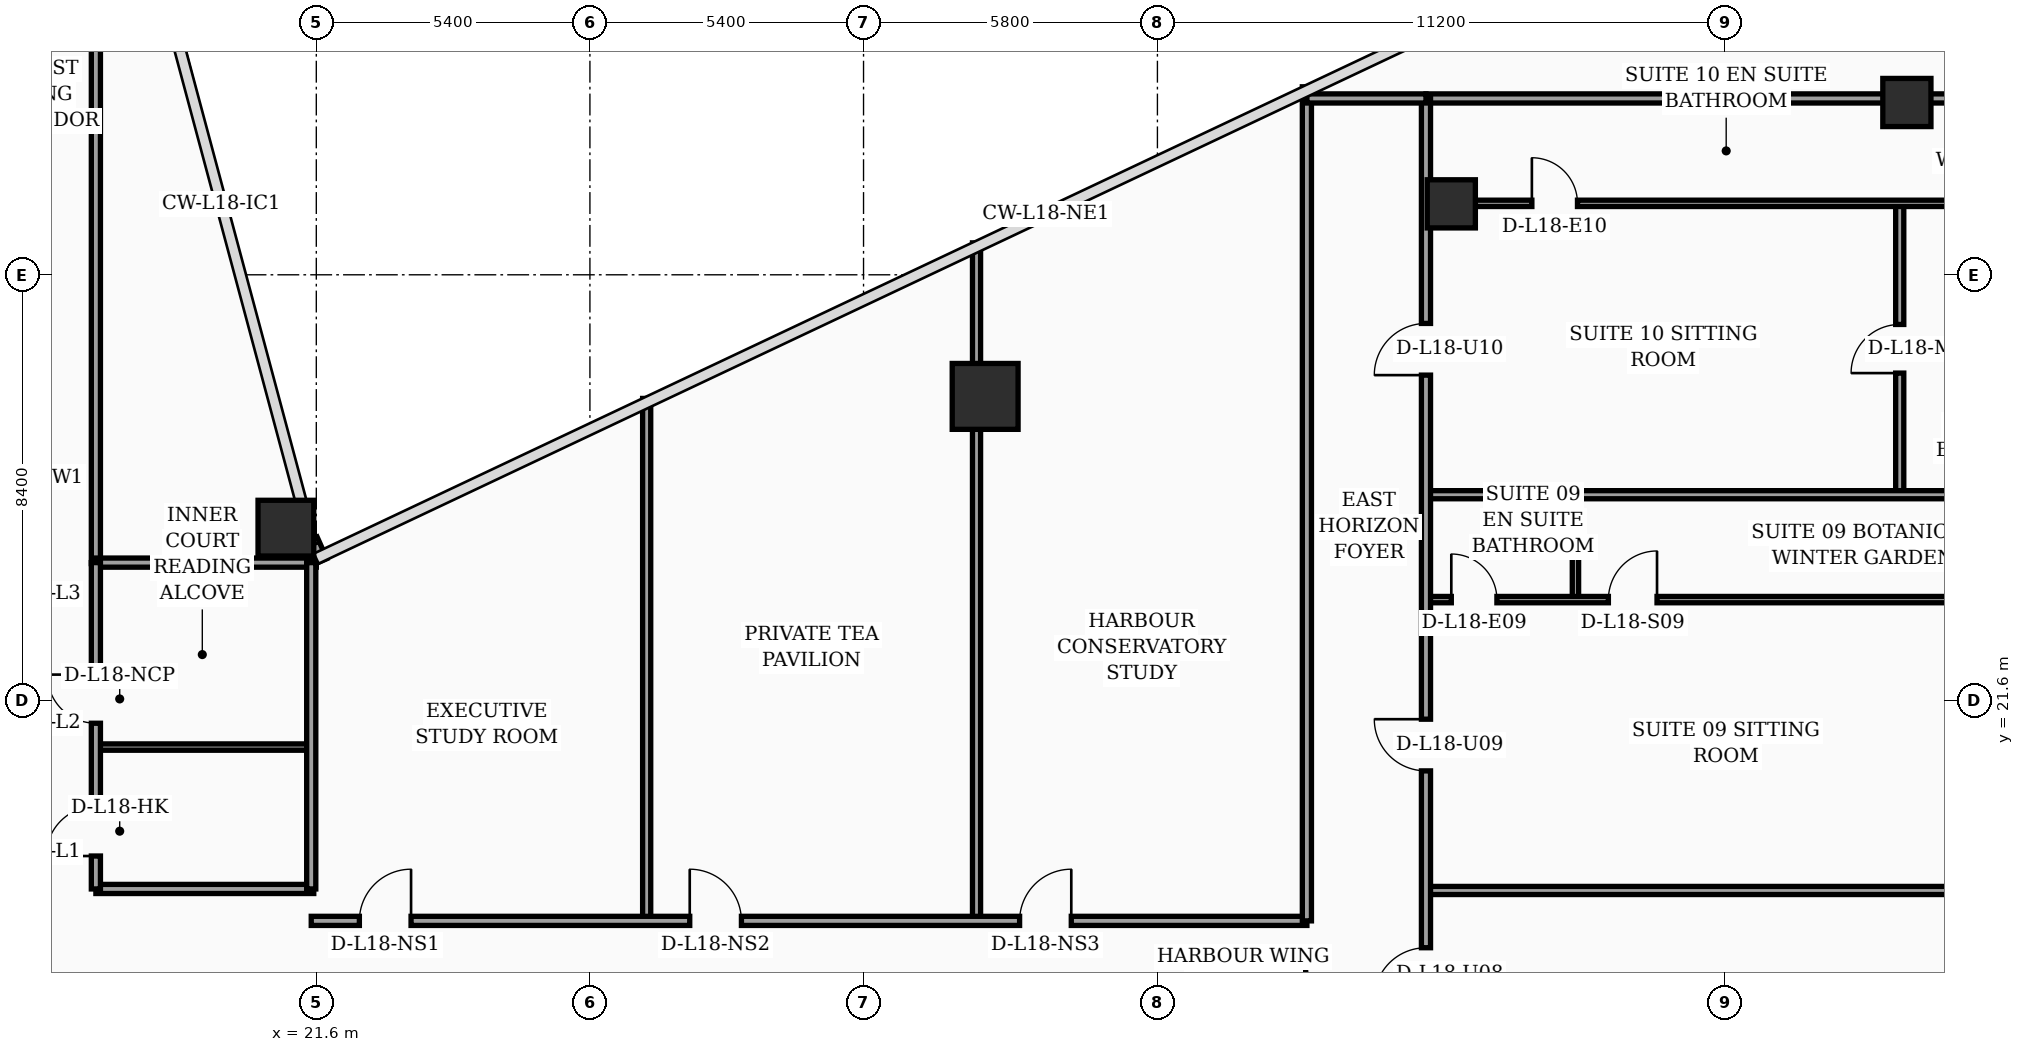
"""IFC4 building model, lengths in metres.
Left out: names, types, materials, properties, quantities, classifications, styles, units other than length and angle.
Written with IfcOpenShell. Run it as: python <this file> out.ifc"""

import sys

from ifc_helpers import new_model, si_unit, direction, frame, frame_2d, origin, origin_2d, place, context, subcontext, project, spatial, rectangle, hollow_rectangle, circle, extrude, element, fill, save


model = new_model("IFC4")
c1 = context("Model", 3, precision=1e-05, world=origin(), true_north=direction((0.0, 1.0)))
c2 = subcontext(c1, "Body", "Model", "MODEL_VIEW")
j1 = project(units=[si_unit("LENGTHUNIT", "METRE"), si_unit("PLANEANGLEUNIT", "RADIAN")], contexts=[c1])
p1 = place(None, origin())
s1 = spatial("IfcSite", under=j1, at=p1, CompositionType="ELEMENT")
p2 = place(p1, origin())
s2 = spatial("IfcBuilding", under=s1, at=p2, CompositionType="ELEMENT")
p3 = place(p2, frame((0.0, 0.0, 77.4)))
s3 = spatial("IfcBuildingStorey", under=s2, at=p3, CompositionType="ELEMENT", Elevation=77.4)
p4 = place(p3, frame((21.0, 25.0, 0.0), z_axis=(0.0, 0.0, 1.0), x_axis=(1.0, 0.0, 0.0)))
e1 = element("IfcColumn", 1, at=p4, inside=s3, PredefinedType="COLUMN", context=c2, shape_type="SweptSolid", body=[
    extrude(hollow_rectangle(XDim=1.1, YDim=1.1, WallThickness=0.045, at=origin_2d()), origin(), (0.0, 0.0, 1.0), 3.56),
])
p5 = place(p3, frame((34.8, 27.6, 0.0), z_axis=(0.0, 0.0, 1.0), x_axis=(1.0, 0.0, 0.0)))
e2 = element("IfcColumn", 2, at=p5, inside=s3, PredefinedType="COLUMN", context=c2, shape_type="SweptSolid", body=[
    extrude(circle(Radius=0.65, at=origin_2d()), origin(), (0.0, 0.0, 1.0), 3.56),
])
for number, where, z_axis, x_axis in (
    (3, (44.0, 31.4, 0.0), (0.0, 0.0, 1.0), (1.0, 0.0, 0.0)),
    (4, (52.991, 33.4, 0.0), (0.0, 0.0, 1.0), (1.0, 0.0, 0.0)),
):
    element("IfcColumn", number, at=place(p3, frame(where, z_axis=z_axis, x_axis=x_axis)), inside=s3, PredefinedType="COLUMN", context=c2, shape_type="SweptSolid", body=[
        extrude(hollow_rectangle(XDim=0.95, YDim=0.95, WallThickness=0.04, at=origin_2d()), origin(), (0.0, 0.0, 1.0), 3.56),
    ])
p6 = place(p3, frame((21.68, 24.34, 0.0), z_axis=(0.0, 0.0, 1.0), x_axis=(-0.40758134973, 0.913168901875, 0.0)))
e5 = element("IfcWall", 5, at=p6, inside=s3, PredefinedType="SOLIDWALL", context=c2, shape_type="SweptSolid", body=[
    extrude(rectangle(XDim=0.471, YDim=0.28, at=frame_2d((0.235, 0.0))), origin(), (0.0, 0.0, 1.0), 3.56),
])
p7 = place(p3, frame((17.25, 24.3, 0.0), z_axis=(0.0, 0.0, 1.0), x_axis=(0.0, 1.0, 0.0)))
e6 = element("IfcWall", 6, at=p7, inside=s3, PredefinedType="PARTITIONING", context=c2, shape_type="SweptSolid", body=[
    extrude(rectangle(XDim=16.4, YDim=0.18, at=frame_2d((8.2, 0.0))), origin(), (0.0, 0.0, 1.0), 2.84),
])
p8 = place(p3, frame((17.25, 17.88, 0.0), z_axis=(0.0, 0.0, 1.0), x_axis=(1.0, 0.0, 0.0)))
e7 = element("IfcWall", 7, at=p8, inside=s3, PredefinedType="PARTITIONING", context=c2, shape_type="SweptSolid", body=[
    extrude(rectangle(XDim=4.3, YDim=0.18, at=frame_2d((2.15, 0.0))), origin(), (0.0, 0.0, 1.0), 3.09),
])
p9 = place(p3, frame((17.25, 20.68, 0.0), z_axis=(0.0, 0.0, 1.0), x_axis=(1.0, 0.0, 0.0)))
e8 = element("IfcWall", 8, at=p9, inside=s3, PredefinedType="PARTITIONING", context=c2, shape_type="SweptSolid", body=[
    extrude(rectangle(XDim=4.3, YDim=0.125, at=frame_2d((2.15, 0.0))), origin(), (0.0, 0.0, 1.0), 3.56),
])
p10 = place(p3, frame((17.25, 24.32, 0.0), z_axis=(0.0, 0.0, 1.0), x_axis=(1.0, 0.0, 0.0)))
e9 = element("IfcWall", 9, at=p10, inside=s3, PredefinedType="PARTITIONING", context=c2, shape_type="SweptSolid", body=[
    extrude(rectangle(XDim=4.35, YDim=0.18, at=frame_2d((2.175, 0.0))), origin(), (0.0, 0.0, 1.0), 3.56),
])
p11 = place(p3, frame((21.5, 17.88, 0.0), z_axis=(0.0, 0.0, 1.0), x_axis=(0.0, 1.0, 0.0)))
e10 = element("IfcWall", 10, at=p11, inside=s3, PredefinedType="PARTITIONING", context=c2, shape_type="SweptSolid", body=[
    extrude(rectangle(XDim=6.44, YDim=0.18, at=frame_2d((3.22, 0.0))), origin(), (0.0, 0.0, 1.0), 3.09),
])
p12 = place(p3, frame((17.25, 17.88, 0.0), z_axis=(0.0, 0.0, 1.0), x_axis=(0.0, 1.0, 0.0)))
e11 = element("IfcWall", 11, at=p12, inside=s3, PredefinedType="PARTITIONING", context=c2, shape_type="SweptSolid", body=[
    extrude(rectangle(XDim=6.44, YDim=0.18, at=frame_2d((3.22, 0.0))), origin(), (0.0, 0.0, 1.0), 3.09),
])
p13 = place(p12, frame((0.65, 0.0, 0.0)))
e12 = element("IfcOpeningElement", 12, at=p13, cuts=e11, PredefinedType="OPENING", context=c2, shape_type="SweptSolid", body=[
    extrude(rectangle(XDim=0.98, YDim=2.15, at=frame_2d((0.49, 1.075))), frame((0.0, 0.1, 0.0), z_axis=(0.0, -1.0, 0.0), x_axis=(1.0, 0.0, 0.0)), (0.0, 0.0, 1.0), 0.2),
])
p14 = place(p12, frame((3.27, 0.0, 0.0)))
e13 = element("IfcOpeningElement", 13, at=p14, cuts=e11, PredefinedType="OPENING", context=c2, shape_type="SweptSolid", body=[
    extrude(rectangle(XDim=0.96, YDim=2.2, at=frame_2d((0.48, 1.1))), frame((0.0, 0.1, 0.0), z_axis=(0.0, -1.0, 0.0), x_axis=(1.0, 0.0, 0.0)), (0.0, 0.0, 1.0), 0.2),
])
p15 = place(p3, frame((28.12, 17.25, 0.0), z_axis=(0.0, 0.0, 1.0), x_axis=(0.0, 1.0, 0.0)))
e14 = element("IfcWall", 14, at=p15, inside=s3, PredefinedType="PARTITIONING", context=c2, shape_type="SweptSolid", body=[
    extrude(rectangle(XDim=10.31, YDim=0.16, at=frame_2d((5.155, 0.0))), origin(), (0.0, 0.0, 1.0), 2.84),
])
p16 = place(p3, frame((34.63, 17.25, 0.0), z_axis=(0.0, 0.0, 1.0), x_axis=(0.0, 1.0, 0.0)))
e15 = element("IfcWall", 15, at=p16, inside=s3, PredefinedType="PARTITIONING", context=c2, shape_type="SweptSolid", body=[
    extrude(rectangle(XDim=13.38, YDim=0.16, at=frame_2d((6.69, 0.0))), origin(), (0.0, 0.0, 1.0), 2.84),
])
p17 = place(p3, frame((21.5, 17.25, 0.0), z_axis=(0.0, 0.0, 1.0), x_axis=(1.0, 0.0, 0.0)))
e16 = element("IfcWall", 16, at=p17, inside=s3, PredefinedType="PARTITIONING", context=c2, shape_type="SweptSolid", body=[
    extrude(rectangle(XDim=19.65, YDim=0.18, at=frame_2d((9.825, 0.0))), origin(), (0.0, 0.0, 1.0), 2.84),
])
p18 = place(p17, frame((0.95, 0.0, 0.0)))
e17 = element("IfcOpeningElement", 17, at=p18, cuts=e16, PredefinedType="OPENING", context=c2, shape_type="SweptSolid", body=[
    extrude(rectangle(XDim=1.02, YDim=2.2, at=frame_2d((0.51, 1.1))), frame((0.0, 0.1, 0.0), z_axis=(0.0, -1.0, 0.0), x_axis=(1.0, 0.0, 0.0)), (0.0, 0.0, 1.0), 0.2),
])
p19 = place(p17, frame((7.47, 0.0, 0.0)))
e18 = element("IfcOpeningElement", 18, at=p19, cuts=e16, PredefinedType="OPENING", context=c2, shape_type="SweptSolid", body=[
    extrude(rectangle(XDim=1.02, YDim=2.2, at=frame_2d((0.51, 1.1))), frame((0.0, 0.1, 0.0), z_axis=(0.0, -1.0, 0.0), x_axis=(1.0, 0.0, 0.0)), (0.0, 0.0, 1.0), 0.2),
])
p20 = place(p17, frame((13.98, 0.0, 0.0)))
e19 = element("IfcOpeningElement", 19, at=p20, cuts=e16, PredefinedType="OPENING", context=c2, shape_type="SweptSolid", body=[
    extrude(rectangle(XDim=1.02, YDim=2.2, at=frame_2d((0.51, 1.1))), frame((0.0, 0.1, 0.0), z_axis=(0.0, -1.0, 0.0), x_axis=(1.0, 0.0, 0.0)), (0.0, 0.0, 1.0), 0.2),
])
p21 = place(p3, frame((41.15, 17.25, 0.0), z_axis=(0.0, 0.0, 1.0), x_axis=(0.0, 1.0, 0.0)))
e20 = element("IfcWall", 20, at=p21, inside=s3, PredefinedType="PARTITIONING", context=c2, shape_type="SweptSolid", body=[
    extrude(rectangle(XDim=16.46, YDim=0.18, at=frame_2d((8.23, 0.0))), origin(), (0.0, 0.0, 1.0), 2.84),
])
p22 = place(p3, frame((46.45, 23.59, 0.0), z_axis=(0.0, 0.0, 1.0), x_axis=(0.0, 1.0, 0.0)))
e21 = element("IfcWall", 21, at=p22, inside=s3, PredefinedType="PARTITIONING", context=c2, shape_type="SweptSolid", body=[
    extrude(rectangle(XDim=2.07, YDim=0.125, at=frame_2d((1.035, 0.0))), origin(), (0.0, 0.0, 1.0), 3.19),
])
p23 = place(p3, frame((43.5, 23.59, 0.0), z_axis=(0.0, 0.0, 1.0), x_axis=(1.0, 0.0, 0.0)))
e22 = element("IfcWall", 22, at=p23, inside=s3, PredefinedType="PARTITIONING", context=c2, shape_type="SweptSolid", body=[
    extrude(rectangle(XDim=14.37, YDim=0.125, at=frame_2d((7.185, 0.0))), origin(), (0.0, 0.0, 1.0), 2.84),
])
p24 = place(p23, frame((0.5, 0.0, 0.0)))
e23 = element("IfcOpeningElement", 23, at=p24, cuts=e22, PredefinedType="OPENING", context=c2, shape_type="SweptSolid", body=[
    extrude(rectangle(XDim=0.9, YDim=2.15, at=frame_2d((0.45, 1.075))), frame((0.0, 0.073, 0.0), z_axis=(0.0, -1.0, 0.0), x_axis=(1.0, 0.0, 0.0)), (0.0, 0.0, 1.0), 0.145),
])
p25 = place(p23, frame((3.6, 0.0, 0.0)))
e24 = element("IfcOpeningElement", 24, at=p25, cuts=e22, PredefinedType="OPENING", context=c2, shape_type="SweptSolid", body=[
    extrude(rectangle(XDim=0.96, YDim=2.2, at=frame_2d((0.48, 1.1))), frame((0.0, 0.073, 0.0), z_axis=(0.0, -1.0, 0.0), x_axis=(1.0, 0.0, 0.0)), (0.0, 0.0, 1.0), 0.145),
])
p26 = place(p3, frame((52.85, 25.66, 0.0), z_axis=(0.0, 0.0, 1.0), x_axis=(0.0, 1.0, 0.0)))
e25 = element("IfcWall", 25, at=p26, inside=s3, PredefinedType="PARTITIONING", context=c2, shape_type="SweptSolid", body=[
    extrude(rectangle(XDim=5.75, YDim=0.16, at=frame_2d((2.875, 0.0))), origin(), (0.0, 0.0, 1.0), 3.56),
])
p27 = place(p26, frame((2.4, 0.0, 0.0)))
e26 = element("IfcOpeningElement", 26, at=p27, cuts=e25, PredefinedType="OPENING", context=c2, shape_type="SweptSolid", body=[
    extrude(rectangle(XDim=0.96, YDim=2.2, at=frame_2d((0.48, 1.1))), frame((0.0, 0.09, 0.0), z_axis=(0.0, -1.0, 0.0), x_axis=(1.0, 0.0, 0.0)), (0.0, 0.0, 1.0), 0.18),
])
p28 = place(p3, frame((43.5, 31.41, 0.0), z_axis=(0.0, 0.0, 1.0), x_axis=(1.0, 0.0, 0.0)))
e27 = element("IfcWall", 27, at=p28, inside=s3, PredefinedType="PARTITIONING", context=c2, shape_type="SweptSolid", body=[
    extrude(rectangle(XDim=11.91, YDim=0.125, at=frame_2d((5.955, 0.0))), origin(), (0.0, 0.0, 1.0), 2.84),
])
p29 = place(p28, frame((2.09, 0.0, 0.0)))
e28 = element("IfcOpeningElement", 28, at=p29, cuts=e27, PredefinedType="OPENING", context=c2, shape_type="SweptSolid", body=[
    extrude(rectangle(XDim=0.9, YDim=2.15, at=frame_2d((0.45, 1.075))), frame((0.0, 0.073, 0.0), z_axis=(0.0, -1.0, 0.0), x_axis=(1.0, 0.0, 0.0)), (0.0, 0.0, 1.0), 0.145),
])
p30 = place(p3, frame((43.5, 25.66, 0.0), z_axis=(0.0, 0.0, 1.0), x_axis=(1.0, 0.0, 0.0)))
e29 = element("IfcWall", 29, at=p30, inside=s3, PredefinedType="PARTITIONING", context=c2, shape_type="SweptSolid", body=[
    extrude(rectangle(XDim=13.72, YDim=0.16, at=frame_2d((6.86, 0.0))), origin(), (0.0, 0.0, 1.0), 2.84),
])
p31 = place(p3, frame((43.5, 17.85, 0.0), z_axis=(0.0, 0.0, 1.0), x_axis=(1.0, 0.0, 0.0)))
e30 = element("IfcWall", 30, at=p31, inside=s3, PredefinedType="PARTITIONING", context=c2, shape_type="SweptSolid", body=[
    extrude(rectangle(XDim=16.18, YDim=0.16, at=frame_2d((8.09, 0.0))), origin(), (0.0, 0.0, 1.0), 2.84),
])
p32 = place(p3, frame((43.5, 33.48, 0.0), z_axis=(0.0, 0.0, 1.0), x_axis=(1.0, 0.0, 0.0)))
e31 = element("IfcWall", 31, at=p32, inside=s3, PredefinedType="PARTITIONING", context=c2, shape_type="SweptSolid", body=[
    extrude(rectangle(XDim=11.26, YDim=0.18, at=frame_2d((5.63, 0.0))), origin(), (0.0, 0.0, 1.0), 2.84),
])
p33 = place(p3, frame((43.5, 2.44, 0.0), z_axis=(0.0, 0.0, 1.0), x_axis=(0.0, 1.0, 0.0)))
e32 = element("IfcWall", 32, at=p33, inside=s3, PredefinedType="PARTITIONING", context=c2, shape_type="SweptSolid", body=[
    extrude(rectangle(XDim=31.04, YDim=0.18, at=frame_2d((15.52, 0.0))), origin(), (0.0, 0.0, 1.0), 2.84),
])
p34 = place(p33, frame((13.26, 0.0, 0.0)))
e33 = element("IfcOpeningElement", 33, at=p34, cuts=e32, PredefinedType="OPENING", context=c2, shape_type="SweptSolid", body=[
    extrude(rectangle(XDim=1.02, YDim=2.2, at=frame_2d((0.51, 1.1))), frame((0.0, 0.1, 0.0), z_axis=(0.0, -1.0, 0.0), x_axis=(1.0, 0.0, 0.0)), (0.0, 0.0, 1.0), 0.2),
])
p35 = place(p33, frame((17.77, 0.0, 0.0)))
e34 = element("IfcOpeningElement", 34, at=p35, cuts=e32, PredefinedType="OPENING", context=c2, shape_type="SweptSolid", body=[
    extrude(rectangle(XDim=1.02, YDim=2.2, at=frame_2d((0.51, 1.1))), frame((0.0, 0.1, 0.0), z_axis=(0.0, -1.0, 0.0), x_axis=(1.0, 0.0, 0.0)), (0.0, 0.0, 1.0), 0.2),
])
p36 = place(p33, frame((25.58, 0.0, 0.0)))
e35 = element("IfcOpeningElement", 35, at=p36, cuts=e32, PredefinedType="OPENING", context=c2, shape_type="SweptSolid", body=[
    extrude(rectangle(XDim=1.02, YDim=2.2, at=frame_2d((0.51, 1.1))), frame((0.0, 0.1, 0.0), z_axis=(0.0, -1.0, 0.0), x_axis=(1.0, 0.0, 0.0)), (0.0, 0.0, 1.0), 0.2),
])
p37 = place(p3, frame((41.15, 33.48, 0.0), z_axis=(0.0, 0.0, 1.0), x_axis=(1.0, 0.0, 0.0)))
e36 = element("IfcWall", 36, at=p37, inside=s3, PredefinedType="PARTITIONING", context=c2, shape_type="SweptSolid", body=[
    extrude(rectangle(XDim=2.35, YDim=0.18, at=frame_2d((1.175, 0.0))), origin(), (0.0, 0.0, 1.0), 3.56),
])
p38 = place(p13, origin())
e37 = element("IfcDoor", 37, at=p38, inside=s3, OperationType="SINGLE_SWING_LEFT", PredefinedType="DOOR", context=c2, shape_type="SweptSolid", body=[
    extrude(rectangle(XDim=0.98, YDim=2.15, at=frame_2d((0.49, 1.075))), frame((0.0, 0.025, 0.0), z_axis=(0.0, -1.0, 0.0), x_axis=(1.0, 0.0, 0.0)), (0.0, 0.0, 1.0), 0.05),
])
fill(e12, e37)
p39 = place(p14, origin())
e38 = element("IfcDoor", 38, at=p39, inside=s3, OperationType="SINGLE_SWING_RIGHT", PredefinedType="DOOR", context=c2, shape_type="SweptSolid", body=[
    extrude(rectangle(XDim=0.96, YDim=2.2, at=frame_2d((0.48, 1.1))), frame((0.0, 0.025, 0.0), z_axis=(0.0, -1.0, 0.0), x_axis=(1.0, 0.0, 0.0)), (0.0, 0.0, 1.0), 0.05),
])
fill(e13, e38)
p40 = place(p18, origin())
e39 = element("IfcDoor", 39, at=p40, inside=s3, OperationType="SINGLE_SWING_RIGHT", PredefinedType="DOOR", context=c2, shape_type="SweptSolid", body=[
    extrude(rectangle(XDim=1.02, YDim=2.2, at=frame_2d((0.51, 1.1))), frame((0.0, 0.025, 0.0), z_axis=(0.0, -1.0, 0.0), x_axis=(1.0, 0.0, 0.0)), (0.0, 0.0, 1.0), 0.05),
])
fill(e17, e39)
p41 = place(p19, origin())
e40 = element("IfcDoor", 40, at=p41, inside=s3, OperationType="SINGLE_SWING_LEFT", PredefinedType="DOOR", context=c2, shape_type="SweptSolid", body=[
    extrude(rectangle(XDim=1.02, YDim=2.2, at=frame_2d((0.51, 1.1))), frame((0.0, 0.025, 0.0), z_axis=(0.0, -1.0, 0.0), x_axis=(1.0, 0.0, 0.0)), (0.0, 0.0, 1.0), 0.05),
])
fill(e18, e40)
p42 = place(p20, origin())
e41 = element("IfcDoor", 41, at=p42, inside=s3, OperationType="SINGLE_SWING_RIGHT", PredefinedType="DOOR", context=c2, shape_type="SweptSolid", body=[
    extrude(rectangle(XDim=1.02, YDim=2.2, at=frame_2d((0.51, 1.1))), frame((0.0, 0.025, 0.0), z_axis=(0.0, -1.0, 0.0), x_axis=(1.0, 0.0, 0.0)), (0.0, 0.0, 1.0), 0.05),
])
fill(e19, e41)
p43 = place(p24, origin())
e42 = element("IfcDoor", 42, at=p43, inside=s3, OperationType="SINGLE_SWING_LEFT", PredefinedType="DOOR", context=c2, shape_type="SweptSolid", body=[
    extrude(rectangle(XDim=0.9, YDim=2.15, at=frame_2d((0.45, 1.075))), frame((0.0, 0.025, 0.0), z_axis=(0.0, -1.0, 0.0), x_axis=(1.0, 0.0, 0.0)), (0.0, 0.0, 1.0), 0.05),
])
fill(e23, e42)
p44 = place(p25, origin())
e43 = element("IfcDoor", 43, at=p44, inside=s3, OperationType="SINGLE_SWING_RIGHT", PredefinedType="DOOR", context=c2, shape_type="SweptSolid", body=[
    extrude(rectangle(XDim=0.96, YDim=2.2, at=frame_2d((0.48, 1.1))), frame((0.0, 0.025, 0.0), z_axis=(0.0, -1.0, 0.0), x_axis=(1.0, 0.0, 0.0)), (0.0, 0.0, 1.0), 0.05),
])
fill(e24, e43)
p45 = place(p27, origin())
e44 = element("IfcDoor", 44, at=p45, inside=s3, OperationType="SINGLE_SWING_LEFT", PredefinedType="DOOR", context=c2, shape_type="SweptSolid", body=[
    extrude(rectangle(XDim=0.96, YDim=2.2, at=frame_2d((0.48, 1.1))), frame((0.0, 0.025, 0.0), z_axis=(0.0, -1.0, 0.0), x_axis=(1.0, 0.0, 0.0)), (0.0, 0.0, 1.0), 0.05),
])
fill(e26, e44)
p46 = place(p29, origin())
e45 = element("IfcDoor", 45, at=p46, inside=s3, OperationType="SINGLE_SWING_LEFT", PredefinedType="DOOR", context=c2, shape_type="SweptSolid", body=[
    extrude(rectangle(XDim=0.9, YDim=2.15, at=frame_2d((0.45, 1.075))), frame((0.0, 0.025, 0.0), z_axis=(0.0, -1.0, 0.0), x_axis=(1.0, 0.0, 0.0)), (0.0, 0.0, 1.0), 0.05),
])
fill(e28, e45)
p47 = place(p34, origin())
e46 = element("IfcDoor", 46, at=p47, inside=s3, OperationType="SINGLE_SWING_LEFT", PredefinedType="DOOR", context=c2, shape_type="SweptSolid", body=[
    extrude(rectangle(XDim=1.02, YDim=2.2, at=frame_2d((0.51, 1.1))), frame((0.0, 0.025, 0.0), z_axis=(0.0, -1.0, 0.0), x_axis=(1.0, 0.0, 0.0)), (0.0, 0.0, 1.0), 0.05),
])
fill(e33, e46)
p48 = place(p35, origin())
e47 = element("IfcDoor", 47, at=p48, inside=s3, OperationType="SINGLE_SWING_RIGHT", PredefinedType="DOOR", context=c2, shape_type="SweptSolid", body=[
    extrude(rectangle(XDim=1.02, YDim=2.2, at=frame_2d((0.51, 1.1))), frame((0.0, 0.025, 0.0), z_axis=(0.0, -1.0, 0.0), x_axis=(1.0, 0.0, 0.0)), (0.0, 0.0, 1.0), 0.05),
])
fill(e34, e47)
p49 = place(p36, origin())
e48 = element("IfcDoor", 48, at=p49, inside=s3, OperationType="SINGLE_SWING_LEFT", PredefinedType="DOOR", context=c2, shape_type="SweptSolid", body=[
    extrude(rectangle(XDim=1.02, YDim=2.2, at=frame_2d((0.51, 1.1))), frame((0.0, 0.025, 0.0), z_axis=(0.0, -1.0, 0.0), x_axis=(1.0, 0.0, 0.0)), (0.0, 0.0, 1.0), 0.05),
])
fill(e35, e48)
save(model, sys.argv[1])
